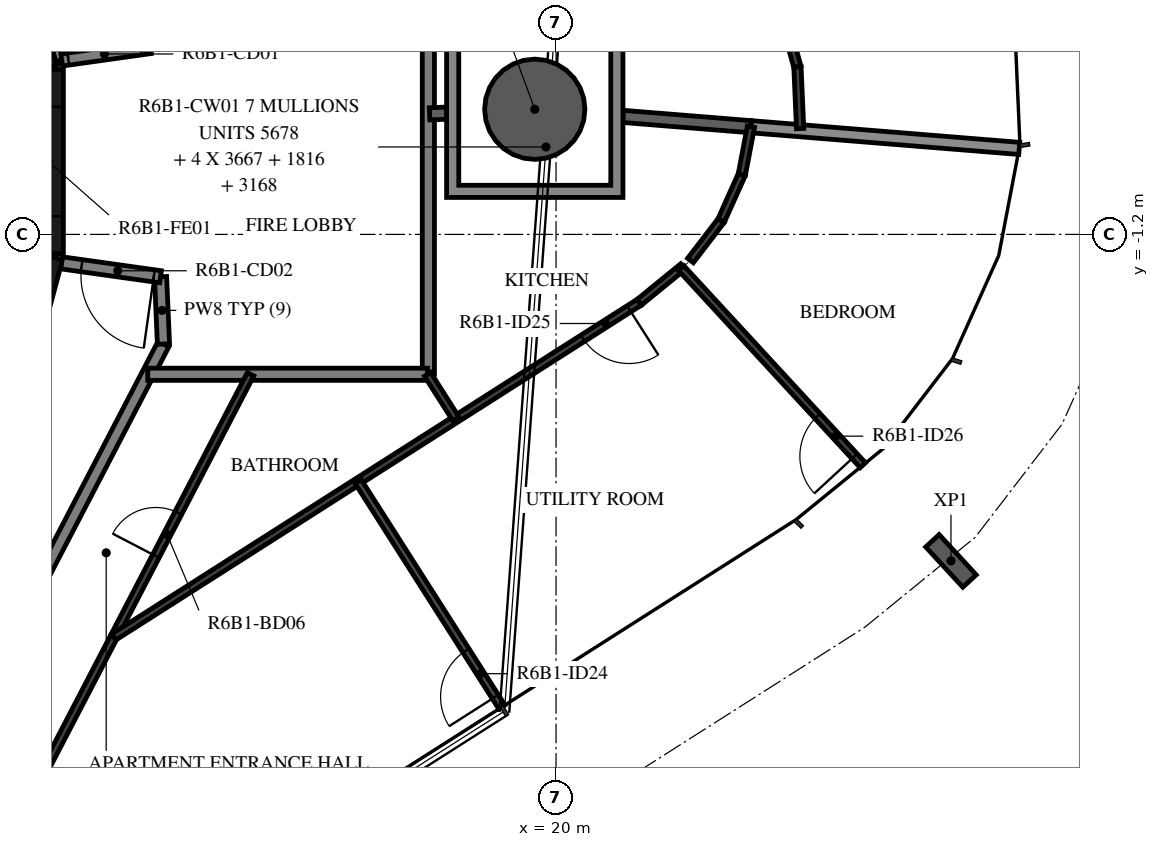
"""IFC4 building model, lengths in metres.
Left out: names, types, materials, properties, quantities, classifications, styles, units other than length and angle.
Written with IfcOpenShell. Run it as: python <this file> out.ifc"""

import sys

from ifc_helpers import new_model, si_unit, direction, frame, frame_2d, origin, origin_2d, place, context, subcontext, project, spatial, polyline, rectangle, hollow_circle, i_section, outline, extrude, element, fill, save


model = new_model("IFC4")
c1 = context("Model", 3, precision=1e-05, world=origin(), true_north=direction((0.0, 1.0)))
c2 = subcontext(c1, "Body", "Model", "MODEL_VIEW")
j1 = project(units=[si_unit("LENGTHUNIT", "METRE"), si_unit("PLANEANGLEUNIT", "RADIAN")], contexts=[c1])
p1 = place(None, origin())
s1 = spatial("IfcSite", under=j1, at=p1, CompositionType="ELEMENT")
p2 = place(p1, origin())
s2 = spatial("IfcBuilding", under=s1, at=p2, CompositionType="ELEMENT")
p3 = place(p2, frame((0.0, 0.0, 237.2)))
s3 = spatial("IfcBuildingStorey", under=s2, at=p3, CompositionType="ELEMENT", Elevation=237.2)
p4 = place(p3, frame((19.65, 0.858, -0.38), z_axis=(0.0, 0.0, 1.0), x_axis=(1.0, 0.0, 0.0)))
e1 = element("IfcColumn", 1, at=p4, inside=s3, PredefinedType="COLUMN", context=c2, shape_type="SweptSolid", body=[
    extrude(hollow_circle(Radius=0.825, WallThickness=0.04, at=origin_2d()), origin(), (0.0, 0.0, 1.0), 3.5),
])
p5 = place(p3, frame((26.495, -6.569, -0.38), z_axis=(0.0, 0.0, 1.0), x_axis=(-0.735346889002, -0.677690897707, 0.0)))
e2 = element("IfcColumn", 2, at=p5, inside=s3, PredefinedType="COLUMN", context=c2, shape_type="SweptSolid", body=[
    extrude(i_section(OverallWidth=0.3, OverallDepth=0.9, WebThickness=0.019, FlangeThickness=0.035, FilletRadius=0.03, at=origin_2d()), origin(), (0.0, 0.0, 1.0), 3.5),
])
p6 = place(p3, frame((10.858, -4.479, 0.0), z_axis=(0.0, 0.0, 1.0), x_axis=(0.258734743916, 0.965948410781, 0.0)))
e3 = element("IfcWall", 3, at=p6, inside=s3, PredefinedType="SHEAR", context=c2, shape_type="SweptSolid", body=[
    extrude(rectangle(XDim=3.033, YDim=0.5, at=frame_2d((1.516, 0.0))), origin(), (0.0, 0.0, 1.0), 3.12),
])
p7 = place(p3, frame((11.647, -1.516, 0.0), z_axis=(0.0, 0.0, 1.0), x_axis=(0.0, 1.0, 0.0)))
e4 = element("IfcWall", 4, at=p7, inside=s3, PredefinedType="SHEAR", context=c2, shape_type="SweptSolid", body=[
    extrude(rectangle(XDim=3.033, YDim=0.5, at=frame_2d((1.516, 0.0))), origin(), (0.0, 0.0, 1.0), 3.12),
])
p8 = place(p7, frame((0.616, 0.0, 0.0)))
e5 = element("IfcOpeningElement", 5, at=p8, cuts=e4, PredefinedType="OPENING", context=c2, shape_type="SweptSolid", body=[
    extrude(rectangle(XDim=1.8, YDim=2.1, at=frame_2d((0.9, 1.05))), frame((0.0, 0.26, 0.0), z_axis=(0.0, -1.0, 0.0), x_axis=(1.0, 0.0, 0.0)), (0.0, 0.0, 1.0), 0.52),
])
p9 = place(p3, frame((11.643, 1.55, 0.0), z_axis=(0.0, 0.0, 1.0), x_axis=(-0.258734743916, 0.965948410781, 0.0)))
e6 = element("IfcWall", 6, at=p9, inside=s3, PredefinedType="SHEAR", context=c2, shape_type="SweptSolid", body=[
    extrude(rectangle(XDim=3.033, YDim=0.5, at=frame_2d((1.516, 0.0))), origin(), (0.0, 0.0, 1.0), 3.12),
])
p10 = place(p3, frame((11.87, 1.668, 0.0), z_axis=(0.0, 0.0, 1.0), x_axis=(-0.258836880648, 0.965921047093, 0.0)))
e7 = element("IfcWall", 7, at=p10, inside=s3, PredefinedType="STANDARD", context=c2, shape_type="SweptSolid", body=[
    extrude(rectangle(XDim=1.695, YDim=0.2, at=frame_2d((0.848, 0.0))), origin(), (0.0, 0.0, 1.0), 3.12),
])
p11 = place(p3, frame((11.87, 1.668, 0.0), z_axis=(0.0, 0.0, 1.0), x_axis=(0.990267985606, 0.139173692496, 0.0)))
e8 = element("IfcWall", 8, at=p11, inside=s3, PredefinedType="STANDARD", context=c2, shape_type="SweptSolid", body=[
    extrude(rectangle(XDim=1.475, YDim=0.2, at=frame_2d((0.738, 0.0))), origin(), (0.0, 0.0, 1.0), 3.12),
])
p12 = place(p11, frame((0.11, 0.0, 0.0)))
e9 = element("IfcOpeningElement", 9, at=p12, cuts=e8, PredefinedType="OPENING", context=c2, shape_type="SweptSolid", body=[
    extrude(rectangle(XDim=1.2, YDim=2.1, at=frame_2d((0.6, 1.05))), frame((0.0, 0.11, 0.0), z_axis=(0.0, -1.0, 0.0), x_axis=(1.0, 0.0, 0.0)), (0.0, 0.0, 1.0), 0.22),
])
p13 = place(p3, frame((10.228, -9.372, 0.0), z_axis=(0.0, 0.0, 1.0), x_axis=(0.461759464021, 0.887005184532, 0.0)))
e10 = element("IfcWall", 10, at=p13, inside=s3, PredefinedType="STANDARD", context=c2, shape_type="SweptSolid", body=[
    extrude(rectangle(XDim=7.181, YDim=0.2, at=frame_2d((3.591, 0.0))), origin(), (0.0, 0.0, 1.0), 3.12),
])
p14 = place(p3, frame((13.544, -3.003, 0.0), z_axis=(0.0, 0.0, 1.0), x_axis=(-0.043666917606, 0.999046145234, 0.0)))
e11 = element("IfcWall", 11, at=p14, inside=s3, PredefinedType="STANDARD", context=c2, shape_type="SweptSolid", body=[
    extrude(rectangle(XDim=1.107, YDim=0.2, at=frame_2d((0.553, 0.0))), origin(), (0.0, 0.0, 1.0), 3.12),
])
p15 = place(p3, frame((13.496, -1.897, 0.0), z_axis=(0.0, 0.0, 1.0), x_axis=(-0.99026234641, 0.139213811391, 0.0)))
e12 = element("IfcWall", 12, at=p15, inside=s3, PredefinedType="STANDARD", context=c2, shape_type="SweptSolid", body=[
    extrude(rectangle(XDim=1.641, YDim=0.2, at=frame_2d((0.821, 0.0))), origin(), (0.0, 0.0, 1.0), 3.12),
])
p16 = place(p15, frame((0.11, 0.0, 0.0)))
e13 = element("IfcOpeningElement", 13, at=p16, cuts=e12, PredefinedType="OPENING", context=c2, shape_type="SweptSolid", body=[
    extrude(rectangle(XDim=1.2, YDim=2.1, at=frame_2d((0.6, 1.05))), frame((0.0, 0.11, 0.0), z_axis=(0.0, -1.0, 0.0), x_axis=(1.0, 0.0, 0.0)), (0.0, 0.0, 1.0), 0.22),
])
p17 = place(p3, frame((17.9, -3.5, 0.0), z_axis=(0.0, 0.0, 1.0), x_axis=(0.0, 1.0, 0.0)))
e14 = element("IfcWall", 14, at=p17, inside=s3, PredefinedType="STANDARD", context=c2, shape_type="SweptSolid", body=[
    extrude(rectangle(XDim=7.0, YDim=0.2, at=frame_2d((3.5, 0.0))), origin(), (0.0, 0.0, 1.0), 3.12),
])
p18 = place(p3, frame((13.285, -3.5, 0.0), z_axis=(0.0, 0.0, 1.0), x_axis=(1.0, 0.0, 0.0)))
e15 = element("IfcWall", 15, at=p18, inside=s3, PredefinedType="STANDARD", context=c2, shape_type="SweptSolid", body=[
    extrude(rectangle(XDim=4.601, YDim=0.2, at=frame_2d((2.301, 0.0))), origin(), (0.0, 0.0, 1.0), 3.12),
])
p19 = place(p3, frame((23.205, 0.571, 0.0), z_axis=(0.0, 0.0, 1.0), x_axis=(0.996747395793, -0.080589260944, 0.0)))
e16 = element("IfcWall", 16, at=p19, inside=s3, PredefinedType="STANDARD", context=c2, shape_type="SweptSolid", body=[
    extrude(rectangle(XDim=4.426, YDim=0.2, at=frame_2d((2.213, 0.0))), origin(), (0.0, 0.0, 1.0), 2.73),
])
p20 = place(p3, frame((21.1, 0.741, 0.0), z_axis=(0.0, 0.0, 1.0), x_axis=(0.996757677143, -0.080461997598, 0.0)))
e17 = element("IfcWall", 17, at=p20, inside=s3, PredefinedType="STANDARD", context=c2, shape_type="SweptSolid", body=[
    extrude(rectangle(XDim=2.112, YDim=0.2, at=frame_2d((1.056, 0.0))), origin(), (0.0, 0.0, 1.0), 3.12),
])
p21 = place(p3, frame((17.92, 0.782, 0.0), z_axis=(0.0, 0.0, 1.0), x_axis=(0.999051221661, 0.04355061995, 0.0)))
e18 = element("IfcWall", 18, at=p21, inside=s3, PredefinedType="STANDARD", context=c2, shape_type="SweptSolid", body=[
    extrude(rectangle(XDim=0.28, YDim=0.2, at=frame_2d((0.14, 0.0))), origin(), (0.0, 0.0, 1.0), 3.12),
])
p22 = place(p3, frame((23.692, 2.532, 0.0), z_axis=(0.0, 0.0, 1.0), x_axis=(0.272721198141, -0.962093107804, 0.0)))
e19 = element("IfcWall", 19, at=p22, inside=s3, PredefinedType="PARTITIONING", context=c2, shape_type="SweptSolid", body=[
    extrude(rectangle(XDim=1.016, YDim=0.12, at=frame_2d((0.508, 0.0))), origin(), (0.0, 0.0, 1.0), 3.12),
])
p23 = place(p3, frame((23.969, 1.555, 0.0), z_axis=(0.0, 0.0, 1.0), x_axis=(0.043739672645, -0.999042962558, 0.0)))
e20 = element("IfcWall", 20, at=p23, inside=s3, PredefinedType="PARTITIONING", context=c2, shape_type="SweptSolid", body=[
    extrude(rectangle(XDim=1.016, YDim=0.12, at=frame_2d((0.508, 0.0))), origin(), (0.0, 0.0, 1.0), 3.12),
])
p24 = place(p3, frame((11.373, -10.421, 0.0), z_axis=(0.0, 0.0, 1.0), x_axis=(0.461746745223, 0.887011805601, 0.0)))
e21 = element("IfcWall", 21, at=p24, inside=s3, PredefinedType="PARTITIONING", context=c2, shape_type="SweptSolid", body=[
    extrude(rectangle(XDim=7.803, YDim=0.12, at=frame_2d((3.901, 0.0))), origin(), (0.0, 0.0, 1.0), 3.12),
])
p25 = place(p24, frame((4.431, 0.0, 0.0)))
e22 = element("IfcOpeningElement", 22, at=p25, cuts=e21, PredefinedType="OPENING", context=c2, shape_type="SweptSolid", body=[
    extrude(rectangle(XDim=0.8, YDim=2.1, at=frame_2d((0.4, 1.05))), frame((0.0, 0.07, 0.0), z_axis=(0.0, -1.0, 0.0), x_axis=(1.0, 0.0, 0.0)), (0.0, 0.0, 1.0), 0.14),
])
p26 = place(p3, frame((21.368, -2.316, 0.0), z_axis=(0.0, 0.0, 1.0), x_axis=(-0.843388627156, -0.537304032726, 0.0)))
e23 = element("IfcWall", 23, at=p26, inside=s3, PredefinedType="PARTITIONING", context=c2, shape_type="SweptSolid", body=[
    extrude(rectangle(XDim=10.246, YDim=0.12, at=frame_2d((5.123, 0.0))), origin(), (0.0, 0.0, 1.0), 3.12),
])
p27 = place(p26, frame((0.2, 0.0, 0.0)))
e24 = element("IfcOpeningElement", 24, at=p27, cuts=e23, PredefinedType="OPENING", context=c2, shape_type="SweptSolid", body=[
    extrude(rectangle(XDim=0.9, YDim=2.1, at=frame_2d((0.45, 1.05))), frame((0.0, 0.07, 0.0), z_axis=(0.0, -1.0, 0.0), x_axis=(1.0, 0.0, 0.0)), (0.0, 0.0, 1.0), 0.14),
])
p28 = place(p3, frame((19.109, -8.972, 0.0), z_axis=(0.0, 0.0, 1.0), x_axis=(-0.537345751125, 0.843362047847, 0.0)))
e25 = element("IfcWall", 25, at=p28, inside=s3, PredefinedType="PARTITIONING", context=c2, shape_type="SweptSolid", body=[
    extrude(rectangle(XDim=4.4, YDim=0.12, at=frame_2d((2.2, 0.0))), origin(), (0.0, 0.0, 1.0), 2.73),
])
p29 = place(p28, frame((0.2, 0.0, 0.0)))
e26 = element("IfcOpeningElement", 26, at=p29, cuts=e25, PredefinedType="OPENING", context=c2, shape_type="SweptSolid", body=[
    extrude(rectangle(XDim=0.9, YDim=2.1, at=frame_2d((0.45, 1.05))), frame((0.0, 0.07, 0.0), z_axis=(0.0, -1.0, 0.0), x_axis=(1.0, 0.0, 0.0)), (0.0, 0.0, 1.0), 0.14),
])
p30 = place(p3, frame((18.355, -4.236, 0.0), z_axis=(0.0, 0.0, 1.0), x_axis=(-0.537400605047, 0.843327095316, 0.0)))
e27 = element("IfcWall", 27, at=p30, inside=s3, PredefinedType="PARTITIONING", context=c2, shape_type="SweptSolid", body=[
    extrude(rectangle(XDim=0.872, YDim=0.12, at=frame_2d((0.436, 0.0))), origin(), (0.0, 0.0, 1.0), 3.12),
])
p31 = place(p3, frame((22.088, -1.729, 0.0), z_axis=(0.0, 0.0, 1.0), x_axis=(-0.775196856296, -0.631719743232, 0.0)))
e28 = element("IfcWall", 28, at=p31, inside=s3, PredefinedType="PARTITIONING", context=c2, shape_type="SweptSolid", body=[
    extrude(rectangle(XDim=0.929, YDim=0.12, at=frame_2d((0.464, 0.0))), origin(), (0.0, 0.0, 1.0), 3.12),
])
p32 = place(p3, frame((25.045, -4.996, 0.0), z_axis=(0.0, 0.0, 1.0), x_axis=(-0.677690998913, 0.735346795731, 0.0)))
e29 = element("IfcWall", 29, at=p32, inside=s3, PredefinedType="PARTITIONING", context=c2, shape_type="SweptSolid", body=[
    extrude(rectangle(XDim=4.408, YDim=0.12, at=frame_2d((2.204, 0.0))), origin(), (0.0, 0.0, 1.0), 3.12),
])
p33 = place(p32, frame((0.2, 0.0, 0.0)))
e30 = element("IfcOpeningElement", 30, at=p33, cuts=e29, PredefinedType="OPENING", context=c2, shape_type="SweptSolid", body=[
    extrude(rectangle(XDim=0.9, YDim=2.1, at=frame_2d((0.45, 1.05))), frame((0.0, 0.07, 0.0), z_axis=(0.0, -1.0, 0.0), x_axis=(1.0, 0.0, 0.0)), (0.0, 0.0, 1.0), 0.14),
])
p34 = place(p3, frame((22.211, -1.629, 0.0), z_axis=(0.0, 0.0, 1.0), x_axis=(0.60891358868, 0.793236560882, 0.0)))
e31 = element("IfcWall", 31, at=p34, inside=s3, PredefinedType="PARTITIONING", context=c2, shape_type="SweptSolid", body=[
    extrude(rectangle(XDim=0.829, YDim=0.12, at=frame_2d((0.415, 0.0))), origin(), (0.0, 0.0, 1.0), 3.12),
])
p35 = place(p3, frame((22.716, -0.972, 0.0), z_axis=(0.0, 0.0, 1.0), x_axis=(0.409335118315, 0.91238410821, 0.0)))
e32 = element("IfcWall", 32, at=p35, inside=s3, PredefinedType="PARTITIONING", context=c2, shape_type="SweptSolid", body=[
    extrude(rectangle(XDim=0.828, YDim=0.12, at=frame_2d((0.414, 0.0))), origin(), (0.0, 0.0, 1.0), 3.12),
])
p36 = place(p3, frame((23.055, -0.216, 0.0), z_axis=(0.0, 0.0, 1.0), x_axis=(0.18778445718, 0.982210261421, 0.0)))
e33 = element("IfcWall", 33, at=p36, inside=s3, PredefinedType="PARTITIONING", context=c2, shape_type="SweptSolid", body=[
    extrude(rectangle(XDim=0.801, YDim=0.12, at=frame_2d((0.4, 0.0))), origin(), (0.0, 0.0, 1.0), 3.12),
])
p37 = place(p3, origin())
e34 = element("IfcWall", 34, at=p37, inside=s3, PredefinedType="STANDARD", context=c2, shape_type="SweptSolid", body=[
    extrude(outline(polyline([(21.1, 2.308), (21.1, -0.592), (18.2, -0.592), (18.2, 2.308), (21.1, 2.308)]), holes=[polyline([(18.4, -0.392), (20.9, -0.392), (20.9, 2.108), (18.4, 2.108), (18.4, -0.392)])]), origin(), (0.0, 0.0, 1.0), 3.12),
])
p38 = place(p25, origin())
e35 = element("IfcDoor", 35, at=p38, inside=s3, OperationType="SINGLE_SWING_RIGHT", PredefinedType="DOOR", context=c2, shape_type="SweptSolid", body=[
    extrude(rectangle(XDim=0.8, YDim=2.1, at=frame_2d((0.4, 1.05))), frame((0.0, 0.025, 0.0), z_axis=(0.0, -1.0, 0.0), x_axis=(1.0, 0.0, 0.0)), (0.0, 0.0, 1.0), 0.05),
])
fill(e22, e35)
p39 = place(p29, origin())
e36 = element("IfcDoor", 36, at=p39, inside=s3, OperationType="SINGLE_SWING_RIGHT", PredefinedType="DOOR", context=c2, shape_type="SweptSolid", body=[
    extrude(rectangle(XDim=0.9, YDim=2.1, at=frame_2d((0.45, 1.05))), frame((0.0, 0.025, 0.0), z_axis=(0.0, -1.0, 0.0), x_axis=(1.0, 0.0, 0.0)), (0.0, 0.0, 1.0), 0.05),
])
fill(e26, e36)
p40 = place(p27, origin())
e37 = element("IfcDoor", 37, at=p40, inside=s3, OperationType="SINGLE_SWING_LEFT", PredefinedType="DOOR", context=c2, shape_type="SweptSolid", body=[
    extrude(rectangle(XDim=0.9, YDim=2.1, at=frame_2d((0.45, 1.05))), frame((0.0, 0.025, 0.0), z_axis=(0.0, -1.0, 0.0), x_axis=(1.0, 0.0, 0.0)), (0.0, 0.0, 1.0), 0.05),
])
fill(e24, e37)
p41 = place(p33, origin())
e38 = element("IfcDoor", 38, at=p41, inside=s3, OperationType="SINGLE_SWING_RIGHT", PredefinedType="DOOR", context=c2, shape_type="SweptSolid", body=[
    extrude(rectangle(XDim=0.9, YDim=2.1, at=frame_2d((0.45, 1.05))), frame((0.0, 0.025, 0.0), z_axis=(0.0, -1.0, 0.0), x_axis=(1.0, 0.0, 0.0)), (0.0, 0.0, 1.0), 0.05),
])
fill(e30, e38)
p42 = place(p12, origin())
e39 = element("IfcDoor", 39, at=p42, inside=s3, OperationType="DOUBLE_DOOR_SINGLE_SWING", PredefinedType="DOOR", context=c2, shape_type="SweptSolid", body=[
    extrude(rectangle(XDim=1.2, YDim=2.1, at=frame_2d((0.6, 1.05))), frame((0.0, 0.025, 0.0), z_axis=(0.0, -1.0, 0.0), x_axis=(1.0, 0.0, 0.0)), (0.0, 0.0, 1.0), 0.05),
])
fill(e9, e39)
p43 = place(p16, origin())
e40 = element("IfcDoor", 40, at=p43, inside=s3, OperationType="DOUBLE_DOOR_SINGLE_SWING", PredefinedType="DOOR", context=c2, shape_type="SweptSolid", body=[
    extrude(rectangle(XDim=1.2, YDim=2.1, at=frame_2d((0.6, 1.05))), frame((0.0, 0.025, 0.0), z_axis=(0.0, -1.0, 0.0), x_axis=(1.0, 0.0, 0.0)), (0.0, 0.0, 1.0), 0.05),
])
fill(e13, e40)
save(model, sys.argv[1])
